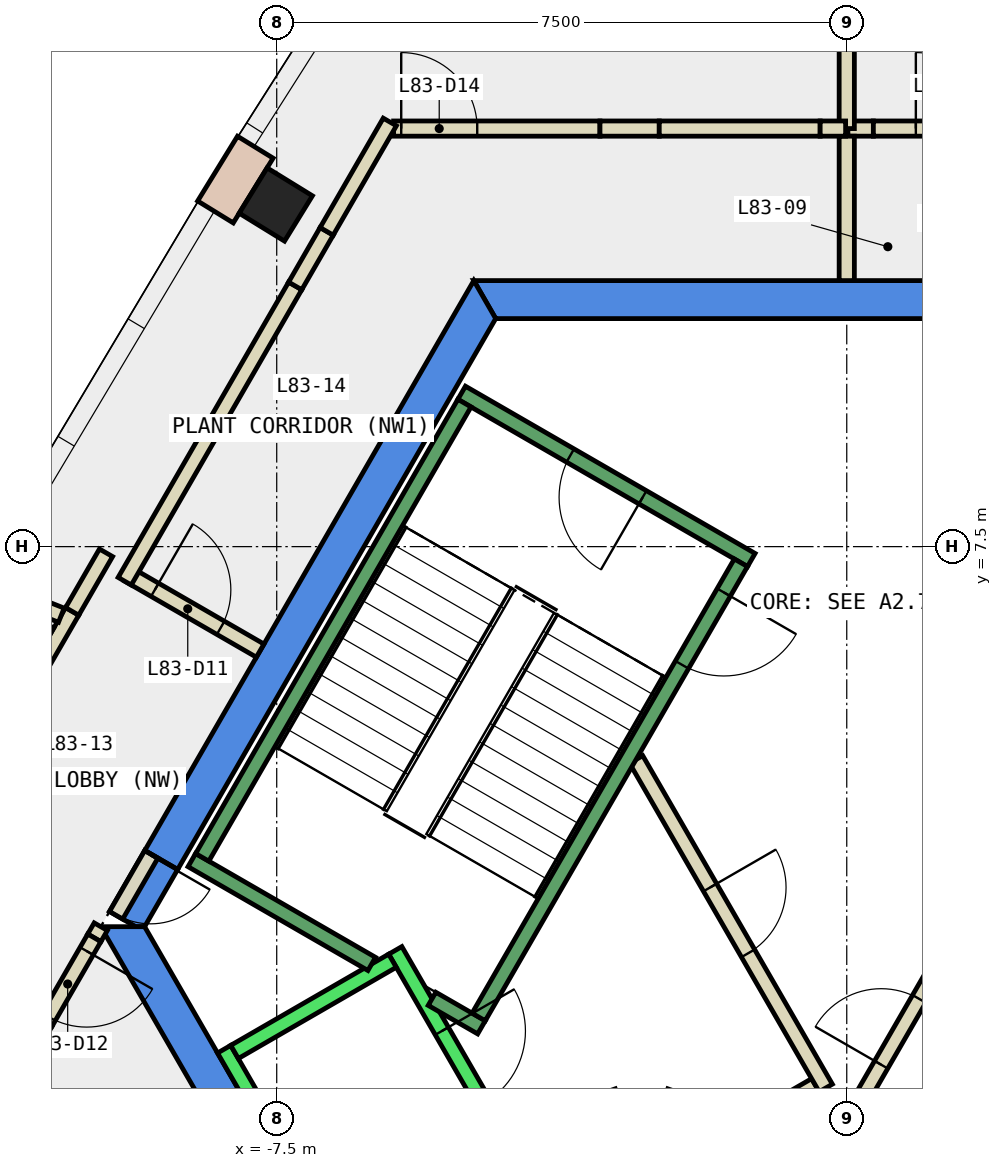
"""IFC4 building model, lengths in metres.
Left out: names, types, materials, properties, quantities, classifications, styles, units other than length and angle.
Written with IfcOpenShell. Run it as: python <this file> out.ifc"""

import sys

from ifc_helpers import new_model, si_unit, direction, frame, frame_2d, origin, origin_2d, place, context, subcontext, project, spatial, polyline, rectangle, outline, extrude, element, fill, save


model = new_model("IFC4")
c1 = context("Model", 3, precision=1e-05, world=origin(), true_north=direction((0.0, 1.0)))
c2 = subcontext(c1, "Body", "Model", "MODEL_VIEW")
j1 = project(units=[si_unit("LENGTHUNIT", "METRE"), si_unit("PLANEANGLEUNIT", "RADIAN")], contexts=[c1])
p1 = place(None, origin())
s1 = spatial("IfcSite", under=j1, at=p1, CompositionType="ELEMENT")
p2 = place(p1, origin())
s2 = spatial("IfcBuilding", under=s1, at=p2, CompositionType="ELEMENT")
p3 = place(p2, frame((0.0, 0.0, 353.9)))
s3 = spatial("IfcBuildingStorey", under=s2, at=p3, CompositionType="ELEMENT", Elevation=353.9)
for number, where, z_axis, x_axis in (
    (1, (-7.512, 12.001, -0.35), (0.0, 0.0, 1.0), (0.524, 0.851, 0.0)),
    (2, (-10.912, 6.3, -0.35), (0.0, 0.0, 1.0), (0.5, 0.866, 0.0)),
):
    element("IfcColumn", number, at=place(p3, frame(where, z_axis=z_axis, x_axis=x_axis)), inside=s3, PredefinedType="COLUMN", context=c2, shape_type="SweptSolid", body=[
        extrude(rectangle(XDim=0.7, YDim=0.7, at=origin_2d()), origin(), (0.0, 0.0, 1.0), 4.4),
    ])
p4 = place(p3, frame((0.0, 0.0, -0.35)))
e3 = element("IfcWall", 3, at=p4, inside=s3, PredefinedType="SHEAR", context=c2, shape_type="SweptSolid", body=[
    extrude(outline(polyline([(4.907, 11.0), (-4.907, 11.0), (-4.619, 10.5), (4.619, 10.5), (4.907, 11.0)])), origin(), (0.0, 0.0, 1.0), 4.4),
])
p5 = place(p3, frame((0.0, 0.0, -0.35)))
e4 = element("IfcWall", 4, at=p5, inside=s3, PredefinedType="SHEAR", context=c2, shape_type="SweptSolid", body=[
    extrude(outline(polyline([(-9.236, 3.502), (-8.803, 3.253), (-4.619, 10.5), (-4.907, 11.0), (-9.236, 3.502)])), origin(), (0.0, 0.0, 1.0), 4.4),
])
p6 = place(p3, frame((0.0, 0.0, 3.6)))
e5 = element("IfcWall", 5, at=p6, inside=s3, PredefinedType="SHEAR", context=c2, shape_type="SweptSolid", body=[
    extrude(outline(polyline([(-9.7, 2.7), (-9.354, 2.5), (-9.238, 2.5), (-8.803, 3.253), (-9.236, 3.502), (-9.7, 2.7)])), origin(), (0.0, 0.0, 1.0), 0.45),
])
p7 = place(p3, frame((0.0, 0.0, -0.35)))
e6 = element("IfcWall", 6, at=p7, inside=s3, PredefinedType="SHEAR", context=c2, shape_type="SweptSolid", body=[
    extrude(outline(polyline([(-9.815, 2.5), (-4.907, -6.0), (-4.619, -5.5), (-9.238, 2.5), (-9.815, 2.5)])), origin(), (0.0, 0.0, 1.0), 4.4),
])
p8 = place(p3, frame((-7.782, 12.755, 0.0), z_axis=(0.0, 0.0, 1.0), x_axis=(-0.523906717346, -0.851775646235, 0.0)))
e7 = element("IfcWall", 7, at=p8, inside=s3, PredefinedType="STANDARD", context=c2, shape_type="SweptSolid", body=[
    extrude(rectangle(XDim=1.0, YDim=0.55, at=frame_2d((0.5, 0.0))), origin(), (0.0, 0.0, 1.0), 4.05),
])
p9 = place(p3, frame((-0.52, -1.0, 0.0), z_axis=(0.0, 0.0, 1.0), x_axis=(0.50011622646, 0.865958290007, 0.0)))
e8 = element("IfcWall", 8, at=p9, inside=s3, PredefinedType="PARTITIONING", context=c2, shape_type="SweptSolid", body=[
    extrude(rectangle(XDim=4.991, YDim=0.2, at=frame_2d((2.496, 0.0))), origin(), (0.0, 0.0, 1.0), 4.05),
])
p10 = place(p9, frame((1.945, 0.0, 0.0)))
e9 = element("IfcOpeningElement", 9, at=p10, cuts=e8, PredefinedType="OPENING", context=c2, shape_type="SweptSolid", body=[
    extrude(rectangle(XDim=1.0, YDim=2.1, at=frame_2d((0.5, 1.05))), frame((0.0, 0.11, 0.0), z_axis=(0.0, -1.0, 0.0), x_axis=(1.0, 0.0, 0.0)), (0.0, 0.0, 1.0), 0.22),
])
p11 = place(p3, frame((-0.412, 0.414, 0.0), z_axis=(0.0, 0.0, 1.0), x_axis=(-0.866017369001, -0.500013916395, 0.0)))
e10 = element("IfcWall", 10, at=p11, inside=s3, PredefinedType="PARTITIONING", context=c2, shape_type="SweptSolid", body=[
    extrude(rectangle(XDim=1.45, YDim=0.2, at=frame_2d((0.725, 0.0))), origin(), (0.0, 0.0, 1.0), 4.05),
])
p12 = place(p3, frame((-2.07, 0.16, 0.0), z_axis=(0.0, 0.0, 1.0), x_axis=(-0.942199461132, 0.335052496547, 0.0)))
e11 = element("IfcWall", 11, at=p12, inside=s3, PredefinedType="PARTITIONING", context=c2, shape_type="SweptSolid", body=[
    extrude(rectangle(XDim=0.337, YDim=0.2, at=frame_2d((0.169, 0.0))), origin(), (0.0, 0.0, 1.0), 4.05),
])
p13 = place(p3, frame((-3.012, 0.273, 0.0), z_axis=(0.0, 0.0, 1.0), x_axis=(-0.942280615813, -0.334824194261, 0.0)))
e12 = element("IfcWall", 12, at=p13, inside=s3, PredefinedType="PARTITIONING", context=c2, shape_type="SweptSolid", body=[
    extrude(rectangle(XDim=0.338, YDim=0.2, at=frame_2d((0.169, 0.0))), origin(), (0.0, 0.0, 1.0), 4.05),
])
p14 = place(p3, frame((-2.771, 4.7, 0.0), z_axis=(0.0, 0.0, 1.0), x_axis=(0.499969479948, -0.866043023828, 0.0)))
e13 = element("IfcWall", 13, at=p14, inside=s3, PredefinedType="PARTITIONING", context=c2, shape_type="SweptSolid", body=[
    extrude(rectangle(XDim=4.99, YDim=0.2, at=frame_2d((2.495, 0.0))), origin(), (0.0, 0.0, 1.0), 4.05),
])
p15 = place(p14, frame((1.945, 0.0, 0.0)))
e14 = element("IfcOpeningElement", 14, at=p15, cuts=e13, PredefinedType="OPENING", context=c2, shape_type="SweptSolid", body=[
    extrude(rectangle(XDim=1.0, YDim=2.1, at=frame_2d((0.5, 1.05))), frame((0.0, 0.11, 0.0), z_axis=(0.0, -1.0, 0.0), x_axis=(1.0, 0.0, 0.0)), (0.0, 0.0, 1.0), 0.22),
])
p16 = place(p3, frame((0.015, 13.0, 0.0), z_axis=(0.0, 0.0, 1.0), x_axis=(1.0, 0.0, 0.0)))
e15 = element("IfcWall", 15, at=p16, inside=s3, PredefinedType="PARTITIONING", context=c2, shape_type="SweptSolid", body=[
    extrude(rectangle(XDim=0.335, YDim=0.2, at=frame_2d((0.167, 0.0))), origin(), (0.0, 0.0, 1.0), 1.95),
])
p17 = place(p3, frame((0.0, 11.0, 0.0), z_axis=(0.0, 0.0, 1.0), x_axis=(0.0, 1.0, 0.0)))
e16 = element("IfcWall", 16, at=p17, inside=s3, PredefinedType="PARTITIONING", context=c2, shape_type="SweptSolid", body=[
    extrude(rectangle(XDim=1.9, YDim=0.2, at=frame_2d((0.95, 0.0))), origin(), (0.0, 0.0, 1.0), 1.95),
])
p18 = place(p3, frame((0.0, 13.0, 0.0), z_axis=(0.0, 0.0, 1.0), x_axis=(0.0, 1.0, 0.0)))
e17 = element("IfcWall", 17, at=p18, inside=s3, PredefinedType="PARTITIONING", context=c2, shape_type="SweptSolid", body=[
    extrude(rectangle(XDim=5.317, YDim=0.2, at=frame_2d((2.658, 0.0))), origin(), (0.0, 0.0, 1.0), 1.95),
])
p19 = place(p3, frame((-9.45, 7.132, 0.0), z_axis=(0.0, 0.0, 1.0), x_axis=(0.866010750942, -0.50002537861, 0.0)))
e18 = element("IfcWall", 18, at=p19, inside=s3, PredefinedType="PARTITIONING", context=c2, shape_type="SweptSolid", body=[
    extrude(rectangle(XDim=2.0, YDim=0.2, at=frame_2d((1.0, 0.0))), origin(), (0.0, 0.0, 1.0), 4.05),
])
p20 = place(p19, frame((0.4, 0.0, 0.0)))
e19 = element("IfcOpeningElement", 19, at=p20, cuts=e18, PredefinedType="OPENING", context=c2, shape_type="SweptSolid", body=[
    extrude(rectangle(XDim=1.0, YDim=2.1, at=frame_2d((0.5, 1.05))), frame((0.0, 0.11, 0.0), z_axis=(0.0, -1.0, 0.0), x_axis=(1.0, 0.0, 0.0)), (0.0, 0.0, 1.0), 0.22),
])
p21 = place(p3, frame((-9.815, 2.5, 0.0), z_axis=(0.0, 0.0, 1.0), x_axis=(-0.5004692653, -0.865754303766, 0.0)))
e20 = element("IfcWall", 20, at=p21, inside=s3, PredefinedType="PARTITIONING", context=c2, shape_type="SweptSolid", body=[
    extrude(rectangle(XDim=0.17, YDim=0.2, at=frame_2d((0.085, 0.0))), origin(), (0.0, 0.0, 1.0), 2.4),
])
p22 = place(p3, frame((-13.346, 1.183, 0.0), z_axis=(0.0, 0.0, 1.0), x_axis=(0.49998814853, 0.866032246126, 0.0)))
e21 = element("IfcWall", 21, at=p22, inside=s3, PredefinedType="PARTITIONING", context=c2, shape_type="SweptSolid", body=[
    extrude(rectangle(XDim=6.31, YDim=0.2, at=frame_2d((3.155, 0.0))), origin(), (0.0, 0.0, 1.0), 1.95),
])
p23 = place(p3, frame((-10.191, 6.648, 0.0), z_axis=(0.0, 0.0, 1.0), x_axis=(0.49973828311, 0.866176453382, 0.0)))
e22 = element("IfcWall", 22, at=p23, inside=s3, PredefinedType="PARTITIONING", context=c2, shape_type="SweptSolid", body=[
    extrude(rectangle(XDim=0.89, YDim=0.2, at=frame_2d((0.445, 0.0))), origin(), (0.0, 0.0, 1.0), 1.95),
])
p24 = place(p3, frame((-9.5, 7.045, 0.0), z_axis=(0.0, 0.0, 1.0), x_axis=(0.499984700226, 0.866034236933, 0.0)))
e23 = element("IfcWall", 23, at=p24, inside=s3, PredefinedType="PARTITIONING", context=c2, shape_type="SweptSolid", body=[
    extrude(rectangle(XDim=4.486, YDim=0.2, at=frame_2d((2.243, 0.0))), origin(), (0.0, 0.0, 1.0), 4.05),
])
p25 = place(p3, frame((-5.962, 13.0, 0.0), z_axis=(0.0, 0.0, 1.0), x_axis=(1.0, 0.0, 0.0)))
e24 = element("IfcWall", 24, at=p25, inside=s3, PredefinedType="PARTITIONING", context=c2, shape_type="SweptSolid", body=[
    extrude(rectangle(XDim=2.715, YDim=0.2, at=frame_2d((1.357, 0.0))), origin(), (0.0, 0.0, 1.0), 4.05),
])
p26 = place(p25, frame((0.1, 0.0, 0.0)))
e25 = element("IfcOpeningElement", 25, at=p26, cuts=e24, PredefinedType="OPENING", context=c2, shape_type="SweptSolid", body=[
    extrude(rectangle(XDim=1.0, YDim=2.1, at=frame_2d((0.5, 1.05))), frame((0.0, 0.11, 0.0), z_axis=(0.0, -1.0, 0.0), x_axis=(1.0, 0.0, 0.0)), (0.0, 0.0, 1.0), 0.22),
])
p27 = place(p3, frame((-10.514, -0.289, 0.0), z_axis=(0.0, 0.0, 1.0), x_axis=(-0.500402557727, 0.865792862191, 0.0)))
e26 = element("IfcWall", 26, at=p27, inside=s3, PredefinedType="PARTITIONING", context=c2, shape_type="SweptSolid", body=[
    extrude(rectangle(XDim=0.911, YDim=0.2, at=frame_2d((0.456, 0.0))), origin(), (0.0, 0.0, 1.0), 1.95),
])
p28 = place(p3, frame((-11.034, 6.876, 0.0), z_axis=(0.0, 0.0, 1.0), x_axis=(0.929345991637, -0.369210005049, 0.0)))
e27 = element("IfcWall", 27, at=p28, inside=s3, PredefinedType="PARTITIONING", context=c2, shape_type="SweptSolid", body=[
    extrude(rectangle(XDim=0.753, YDim=0.2, at=frame_2d((0.376, 0.0))), origin(), (0.0, 0.0, 1.0), 1.95),
])
p29 = place(p3, frame((-9.15, 3.452, 0.0), z_axis=(0.0, 0.0, 1.0), x_axis=(-0.500079945886, -0.865979242085, 0.0)))
e28 = element("IfcWall", 28, at=p29, inside=s3, PredefinedType="PARTITIONING", context=c2, shape_type="SweptSolid", body=[
    extrude(rectangle(XDim=0.926, YDim=0.2, at=frame_2d((0.463, 0.0))), origin(), (0.0, 0.0, 1.0), 2.4),
])
p30 = place(p29, frame((0.017, 0.0, 0.0)))
e29 = element("IfcOpeningElement", 29, at=p30, cuts=e28, PredefinedType="OPENING", context=c2, shape_type="SweptSolid", body=[
    extrude(rectangle(XDim=0.9, YDim=2.1, at=frame_2d((0.45, 1.05))), frame((0.0, 0.11, 0.0), z_axis=(0.0, -1.0, 0.0), x_axis=(1.0, 0.0, 0.0)), (0.0, 0.0, 1.0), 0.22),
])
p31 = place(p3, frame((0.35, 13.0, 0.0), z_axis=(0.0, 0.0, 1.0), x_axis=(1.0, 0.0, 0.0)))
e30 = element("IfcWall", 30, at=p31, inside=s3, PredefinedType="PARTITIONING", context=c2, shape_type="SweptSolid", body=[
    extrude(rectangle(XDim=2.117, YDim=0.2, at=frame_2d((1.059, 0.0))), origin(), (0.0, 0.0, 1.0), 4.05),
])
p32 = place(p31, frame((0.559, 0.0, 0.0)))
e31 = element("IfcOpeningElement", 31, at=p32, cuts=e30, PredefinedType="OPENING", context=c2, shape_type="SweptSolid", body=[
    extrude(rectangle(XDim=1.0, YDim=2.1, at=frame_2d((0.5, 1.05))), frame((0.0, 0.11, 0.0), z_axis=(0.0, -1.0, 0.0), x_axis=(1.0, 0.0, 0.0)), (0.0, 0.0, 1.0), 0.22),
])
p33 = place(p3, frame((-9.9, 2.353, 0.0), z_axis=(0.0, 0.0, 1.0), x_axis=(-0.499848207415, -0.866113023539, 0.0)))
e32 = element("IfcWall", 32, at=p33, inside=s3, PredefinedType="PARTITIONING", context=c2, shape_type="SweptSolid", body=[
    extrude(rectangle(XDim=1.289, YDim=0.2, at=frame_2d((0.644, 0.0))), origin(), (0.0, 0.0, 1.0), 4.05),
])
p34 = place(p33, frame((0.201, 0.0, 0.0)))
e33 = element("IfcOpeningElement", 33, at=p34, cuts=e32, PredefinedType="OPENING", context=c2, shape_type="SweptSolid", body=[
    extrude(rectangle(XDim=1.0, YDim=2.1, at=frame_2d((0.5, 1.05))), frame((0.0, 0.11, 0.0), z_axis=(0.0, -1.0, 0.0), x_axis=(1.0, 0.0, 0.0)), (0.0, 0.0, 1.0), 0.22),
])
p35 = place(p3, frame((-7.257, 10.93, 0.0), z_axis=(0.0, 0.0, 1.0), x_axis=(0.499560947681, 0.866278742411, 0.0)))
e34 = element("IfcWall", 34, at=p35, inside=s3, PredefinedType="PARTITIONING", context=c2, shape_type="SweptSolid", body=[
    extrude(rectangle(XDim=0.829, YDim=0.2, at=frame_2d((0.415, 0.0))), origin(), (0.0, 0.0, 1.0), 1.95),
])
p36 = place(p3, frame((-6.843, 11.648, 0.0), z_axis=(0.0, 0.0, 1.0), x_axis=(0.500120931396, 0.865955572752, 0.0)))
e35 = element("IfcWall", 35, at=p36, inside=s3, PredefinedType="PARTITIONING", context=c2, shape_type="SweptSolid", body=[
    extrude(rectangle(XDim=1.662, YDim=0.2, at=frame_2d((0.831, 0.0))), origin(), (0.0, 0.0, 1.0), 4.05),
])
p37 = place(p3, frame((-3.247, 13.0, 0.0), z_axis=(0.0, 0.0, 1.0), x_axis=(1.0, 0.0, 0.0)))
e36 = element("IfcWall", 36, at=p37, inside=s3, PredefinedType="PARTITIONING", context=c2, shape_type="SweptSolid", body=[
    extrude(rectangle(XDim=0.78, YDim=0.2, at=frame_2d((0.39, 0.0))), origin(), (0.0, 0.0, 1.0), 1.95),
])
p38 = place(p3, frame((-2.467, 13.0, 0.0), z_axis=(0.0, 0.0, 1.0), x_axis=(1.0, 0.0, 0.0)))
e37 = element("IfcWall", 37, at=p38, inside=s3, PredefinedType="PARTITIONING", context=c2, shape_type="SweptSolid", body=[
    extrude(rectangle(XDim=2.117, YDim=0.2, at=frame_2d((1.059, 0.0))), origin(), (0.0, 0.0, 1.0), 4.05),
])
p39 = place(p3, frame((-0.35, 13.0, 0.0), z_axis=(0.0, 0.0, 1.0), x_axis=(1.0, 0.0, 0.0)))
e38 = element("IfcWall", 38, at=p39, inside=s3, PredefinedType="PARTITIONING", context=c2, shape_type="SweptSolid", body=[
    extrude(rectangle(XDim=0.335, YDim=0.2, at=frame_2d((0.167, 0.0))), origin(), (0.0, 0.0, 1.0), 1.95),
])
p40 = place(p3, frame((-5.94, 2.188, 0.0), z_axis=(0.0, 0.0, 1.0), x_axis=(0.49994636267, -0.866056369097, 0.0)))
e39 = element("IfcWall", 39, at=p40, inside=s3, PredefinedType="STANDARD", context=c2, shape_type="SweptSolid", body=[
    extrude(rectangle(XDim=2.8, YDim=0.2, at=frame_2d((1.4, 0.0))), origin(), (0.0, 0.0, 1.0), 4.05),
])
p41 = place(p40, frame((1.225, 0.0, 0.0)))
e40 = element("IfcOpeningElement", 40, at=p41, cuts=e39, PredefinedType="OPENING", context=c2, shape_type="SweptSolid", body=[
    extrude(rectangle(XDim=1.1, YDim=2.1, at=frame_2d((0.55, 1.05))), frame((0.0, 0.11, 0.0), z_axis=(0.0, -1.0, 0.0), x_axis=(1.0, 0.0, 0.0)), (0.0, 0.0, 1.0), 0.22),
])
p42 = place(p3, frame((-8.192, 0.888, 0.0), z_axis=(0.0, 0.0, 1.0), x_axis=(0.49994636267, -0.866056369097, 0.0)))
e41 = element("IfcWall", 41, at=p42, inside=s3, PredefinedType="STANDARD", context=c2, shape_type="SweptSolid", body=[
    extrude(rectangle(XDim=2.8, YDim=0.2, at=frame_2d((1.4, 0.0))), origin(), (0.0, 0.0, 1.0), 4.05),
])
p43 = place(p3, frame((-5.977, 2.052, 0.0), z_axis=(0.0, 0.0, 1.0), x_axis=(-0.865973769406, -0.500089422704, 0.0)))
e42 = element("IfcWall", 42, at=p43, inside=s3, PredefinedType="STANDARD", context=c2, shape_type="SweptSolid", body=[
    extrude(rectangle(XDim=2.399, YDim=0.2, at=frame_2d((1.2, 0.0))), origin(), (0.0, 0.0, 1.0), 4.05),
])
p44 = place(p3, frame((-1.256, 7.324, 0.0), z_axis=(0.0, 0.0, 1.0), x_axis=(-0.866046073146, 0.499964197906, 0.0)))
e43 = element("IfcWall", 43, at=p44, inside=s3, PredefinedType="STANDARD", context=c2, shape_type="SweptSolid", body=[
    extrude(rectangle(XDim=4.4, YDim=0.2, at=frame_2d((2.2, 0.0))), origin(), (0.0, 0.0, 1.0), 4.05),
])
p45 = place(p44, frame((1.65, 0.0, 0.0)))
e44 = element("IfcOpeningElement", 44, at=p45, cuts=e43, PredefinedType="OPENING", context=c2, shape_type="SweptSolid", body=[
    extrude(rectangle(XDim=1.1, YDim=2.2, at=frame_2d((0.55, 1.1))), frame((0.0, 0.11, 0.0), z_axis=(0.0, -1.0, 0.0), x_axis=(1.0, 0.0, 0.0)), (0.0, 0.0, 1.0), 0.22),
])
p46 = place(p3, frame((-6.25, 2.01, 0.0), z_axis=(0.0, 0.0, 1.0), x_axis=(-0.86611865017, 0.499838457731, 0.0)))
e45 = element("IfcWall", 45, at=p46, inside=s3, PredefinedType="STANDARD", context=c2, shape_type="SweptSolid", body=[
    extrude(rectangle(XDim=2.733, YDim=0.2, at=frame_2d((1.366, 0.0))), origin(), (0.0, 0.0, 1.0), 4.05),
])
p47 = place(p3, frame((-4.806, 1.176, 0.0), z_axis=(0.0, 0.0, 1.0), x_axis=(-0.866558586415, 0.499075361355, 0.0)))
e46 = element("IfcWall", 46, at=p47, inside=s3, PredefinedType="STANDARD", context=c2, shape_type="SweptSolid", body=[
    extrude(rectangle(XDim=0.751, YDim=0.2, at=frame_2d((0.376, 0.0))), origin(), (0.0, 0.0, 1.0), 4.05),
])
p48 = place(p3, frame((-1.393, 7.288, 0.0), z_axis=(0.0, 0.0, 1.0), x_axis=(-0.499963383562, -0.866046543262, 0.0)))
e47 = element("IfcWall", 47, at=p48, inside=s3, PredefinedType="STANDARD", context=c2, shape_type="SweptSolid", body=[
    extrude(rectangle(XDim=6.9, YDim=0.2, at=frame_2d((3.45, 0.0))), origin(), (0.0, 0.0, 1.0), 4.05),
])
p49 = place(p48, frame((0.45, 0.0, 0.0)))
e48 = element("IfcOpeningElement", 48, at=p49, cuts=e47, PredefinedType="OPENING", context=c2, shape_type="SweptSolid", body=[
    extrude(rectangle(XDim=1.1, YDim=2.2, at=frame_2d((0.55, 1.1))), frame((0.0, 0.11, 0.0), z_axis=(0.0, -1.0, 0.0), x_axis=(1.0, 0.0, 0.0)), (0.0, 0.0, 1.0), 0.22),
])
p50 = place(p3, frame((-5.03, 9.388, 0.0), z_axis=(0.0, 0.0, 1.0), x_axis=(-0.499978703459, -0.866037698999, 0.0)))
e49 = element("IfcWall", 49, at=p50, inside=s3, PredefinedType="STANDARD", context=c2, shape_type="SweptSolid", body=[
    extrude(rectangle(XDim=6.9, YDim=0.2, at=frame_2d((3.45, 0.0))), origin(), (0.0, 0.0, 1.0), 4.05),
])
p51 = place(p32, origin())
e50 = element("IfcDoor", 50, at=p51, inside=s3, OperationType="SINGLE_SWING_LEFT", PredefinedType="DOOR", context=c2, shape_type="SweptSolid", body=[
    extrude(rectangle(XDim=1.0, YDim=2.1, at=frame_2d((0.5, 1.05))), frame((0.0, 0.025, 0.0), z_axis=(0.0, -1.0, 0.0), x_axis=(1.0, 0.0, 0.0)), (0.0, 0.0, 1.0), 0.05),
])
fill(e31, e50)
p52 = place(p20, origin())
e51 = element("IfcDoor", 51, at=p52, inside=s3, OperationType="SINGLE_SWING_LEFT", PredefinedType="DOOR", context=c2, shape_type="SweptSolid", body=[
    extrude(rectangle(XDim=1.0, YDim=2.1, at=frame_2d((0.5, 1.05))), frame((0.0, 0.025, 0.0), z_axis=(0.0, -1.0, 0.0), x_axis=(1.0, 0.0, 0.0)), (0.0, 0.0, 1.0), 0.05),
])
fill(e19, e51)
p53 = place(p34, origin())
e52 = element("IfcDoor", 52, at=p53, inside=s3, OperationType="SINGLE_SWING_RIGHT", PredefinedType="DOOR", context=c2, shape_type="SweptSolid", body=[
    extrude(rectangle(XDim=1.0, YDim=2.1, at=frame_2d((0.5, 1.05))), frame((0.0, 0.025, 0.0), z_axis=(0.0, -1.0, 0.0), x_axis=(1.0, 0.0, 0.0)), (0.0, 0.0, 1.0), 0.05),
])
fill(e33, e52)
p54 = place(p26, origin())
e53 = element("IfcDoor", 53, at=p54, inside=s3, OperationType="SINGLE_SWING_RIGHT", PredefinedType="DOOR", context=c2, shape_type="SweptSolid", body=[
    extrude(rectangle(XDim=1.0, YDim=2.1, at=frame_2d((0.5, 1.05))), frame((0.0, 0.025, 0.0), z_axis=(0.0, -1.0, 0.0), x_axis=(1.0, 0.0, 0.0)), (0.0, 0.0, 1.0), 0.05),
])
fill(e25, e53)
p55 = place(p10, origin())
e54 = element("IfcDoor", 54, at=p55, inside=s3, OperationType="SINGLE_SWING_LEFT", PredefinedType="DOOR", context=c2, shape_type="SweptSolid", body=[
    extrude(rectangle(XDim=1.0, YDim=2.1, at=frame_2d((0.5, 1.05))), frame((0.0, 0.025, 0.0), z_axis=(0.0, -1.0, 0.0), x_axis=(1.0, 0.0, 0.0)), (0.0, 0.0, 1.0), 0.05),
])
fill(e9, e54)
p56 = place(p15, origin())
e55 = element("IfcDoor", 55, at=p56, inside=s3, OperationType="SINGLE_SWING_RIGHT", PredefinedType="DOOR", context=c2, shape_type="SweptSolid", body=[
    extrude(rectangle(XDim=1.0, YDim=2.1, at=frame_2d((0.5, 1.05))), frame((0.0, 0.025, 0.0), z_axis=(0.0, -1.0, 0.0), x_axis=(1.0, 0.0, 0.0)), (0.0, 0.0, 1.0), 0.05),
])
fill(e14, e55)
p57 = place(p30, origin())
e56 = element("IfcDoor", 56, at=p57, inside=s3, OperationType="SINGLE_SWING_LEFT", PredefinedType="DOOR", context=c2, shape_type="SweptSolid", body=[
    extrude(rectangle(XDim=0.9, YDim=2.1, at=frame_2d((0.45, 1.05))), frame((0.0, 0.025, 0.0), z_axis=(0.0, -1.0, 0.0), x_axis=(1.0, 0.0, 0.0)), (0.0, 0.0, 1.0), 0.05),
])
fill(e29, e56)
p58 = place(p41, origin())
e57 = element("IfcDoor", 57, at=p58, inside=s3, OperationType="SLIDING_TO_LEFT", PredefinedType="DOOR", context=c2, shape_type="SweptSolid", body=[
    extrude(rectangle(XDim=1.1, YDim=2.1, at=frame_2d((0.55, 1.05))), frame((0.0, 0.025, 0.0), z_axis=(0.0, -1.0, 0.0), x_axis=(1.0, 0.0, 0.0)), (0.0, 0.0, 1.0), 0.05),
])
fill(e40, e57)
p59 = place(p49, origin())
e58 = element("IfcDoor", 58, at=p59, inside=s3, OperationType="SINGLE_SWING_LEFT", PredefinedType="DOOR", context=c2, shape_type="SweptSolid", body=[
    extrude(rectangle(XDim=1.1, YDim=2.2, at=frame_2d((0.55, 1.1))), frame((0.0, 0.025, 0.0), z_axis=(0.0, -1.0, 0.0), x_axis=(1.0, 0.0, 0.0)), (0.0, 0.0, 1.0), 0.05),
])
fill(e48, e58)
p60 = place(p45, origin())
e59 = element("IfcDoor", 59, at=p60, inside=s3, OperationType="SINGLE_SWING_LEFT", PredefinedType="DOOR", context=c2, shape_type="SweptSolid", body=[
    extrude(rectangle(XDim=1.1, YDim=2.2, at=frame_2d((0.55, 1.1))), frame((0.0, 0.025, 0.0), z_axis=(0.0, -1.0, 0.0), x_axis=(1.0, 0.0, 0.0)), (0.0, 0.0, 1.0), 0.05),
])
fill(e44, e59)
save(model, sys.argv[1])
